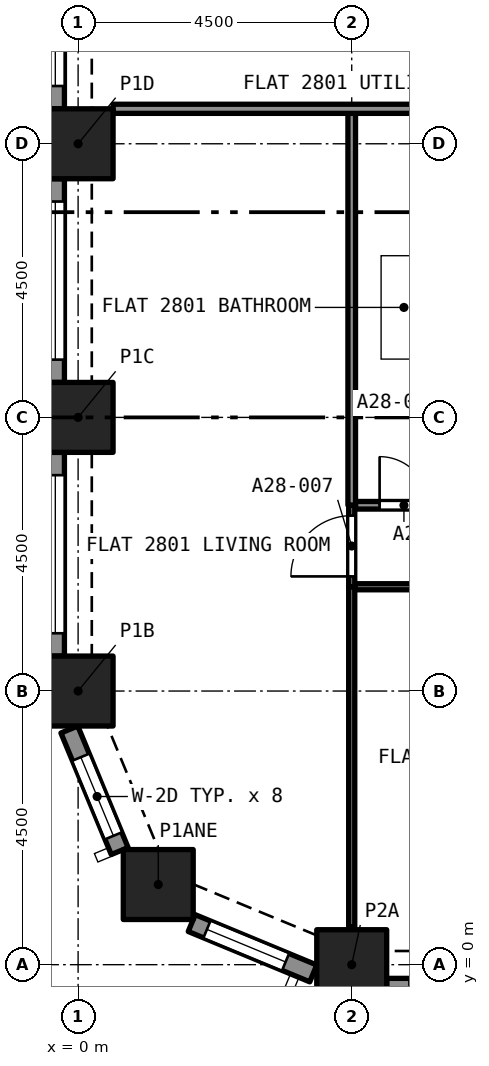
"""IFC4 building model, lengths in metres.
Left out: names, types, materials, properties, quantities, classifications, styles, units other than length and angle.
Written with IfcOpenShell. Run it as: python <this file> out.ifc"""

import sys

from ifc_helpers import new_model, si_unit, direction, frame, frame_2d, origin, origin_2d, place, context, subcontext, project, spatial, rectangle, extrude, element, fill, save


model = new_model("IFC4")
c1 = context("Model", 3, precision=1e-05, world=origin(), true_north=direction((0.0, 1.0)))
c2 = subcontext(c1, "Body", "Model", "MODEL_VIEW")
j1 = project(units=[si_unit("LENGTHUNIT", "METRE"), si_unit("PLANEANGLEUNIT", "RADIAN")], contexts=[c1])
p1 = place(None, origin())
s1 = spatial("IfcSite", under=j1, at=p1, CompositionType="ELEMENT")
p2 = place(p1, origin())
s2 = spatial("IfcBuilding", under=s1, at=p2, CompositionType="ELEMENT")
p3 = place(p2, frame((0.0, 0.0, 102.4)))
s3 = spatial("IfcBuildingStorey", under=s2, at=p3, CompositionType="ELEMENT", Elevation=102.4)
for number, where, z_axis, x_axis in (
    (1, (4.5, 0.0, 0.0), (0.0, 0.0, 1.0), (1.0, 0.0, 0.0)),
    (2, (1.318, 1.318, 0.0), (0.0, 0.0, 1.0), (1.0, 0.0, 0.0)),
    (3, (0.0, 4.5, 0.0), (0.0, 0.0, 1.0), (1.0, 0.0, 0.0)),
    (4, (0.0, 9.0, 0.0), (0.0, 0.0, 1.0), (1.0, 0.0, 0.0)),
    (5, (0.0, 13.5, 0.0), (0.0, 0.0, 1.0), (1.0, 0.0, 0.0)),
):
    element("IfcColumn", number, at=place(p3, frame(where, z_axis=z_axis, x_axis=x_axis)), inside=s3, PredefinedType="COLUMN", context=c2, shape_type="SweptSolid", body=[
        extrude(rectangle(XDim=1.15, YDim=1.15, at=origin_2d()), origin(), (0.0, 0.0, 1.0), 3.2),
    ])
p4 = place(p3, frame((0.684, 1.869, 0.0), z_axis=(0.0, 0.0, 1.0), x_axis=(-0.382723818695, 0.923862802911, 0.0)))
e6 = element("IfcWall", 6, at=p4, inside=s3, PredefinedType="SOLIDWALL", context=c2, shape_type="SweptSolid", body=[
    extrude(rectangle(XDim=2.164, YDim=0.3, at=frame_2d((1.082, 0.0))), origin(), (0.0, 0.0, 1.0), 3.2),
])
p5 = place(p4, frame((0.271, 0.0, 0.45)))
e7 = element("IfcOpeningElement", 7, at=p5, cuts=e6, PredefinedType="OPENING", context=c2, shape_type="SweptSolid", body=[
    extrude(rectangle(XDim=1.4, YDim=1.95, at=frame_2d((0.7, 0.975))), frame((0.0, 0.16, 0.0), z_axis=(0.0, -1.0, 0.0), x_axis=(1.0, 0.0, 0.0)), (0.0, 0.0, 1.0), 0.32),
])
p6 = place(p3, frame((3.868, -0.144, 0.0), z_axis=(0.0, 0.0, 1.0), x_axis=(-0.923862802911, 0.382723818695, 0.0)))
e8 = element("IfcWall", 8, at=p6, inside=s3, PredefinedType="SOLIDWALL", context=c2, shape_type="SweptSolid", body=[
    extrude(rectangle(XDim=2.164, YDim=0.3, at=frame_2d((1.082, 0.0))), origin(), (0.0, 0.0, 1.0), 3.2),
])
p7 = place(p6, frame((0.493, 0.0, 0.45)))
e9 = element("IfcOpeningElement", 9, at=p7, cuts=e8, PredefinedType="OPENING", context=c2, shape_type="SweptSolid", body=[
    extrude(rectangle(XDim=1.4, YDim=1.95, at=frame_2d((0.7, 0.975))), frame((0.0, 0.16, 0.0), z_axis=(0.0, -1.0, 0.0), x_axis=(1.0, 0.0, 0.0)), (0.0, 0.0, 1.0), 0.32),
])
p8 = place(p3, frame((8.425, -0.375, 0.0), z_axis=(0.0, 0.0, 1.0), x_axis=(-1.0, 0.0, 0.0)))
e10 = element("IfcWall", 10, at=p8, inside=s3, PredefinedType="SOLIDWALL", context=c2, shape_type="SweptSolid", body=[
    extrude(rectangle(XDim=3.35, YDim=0.3, at=frame_2d((1.675, 0.0))), origin(), (0.0, 0.0, 1.0), 3.2),
])
p9 = place(p8, frame((0.375, 0.0, 0.45)))
e11 = element("IfcOpeningElement", 11, at=p9, cuts=e10, PredefinedType="OPENING", context=c2, shape_type="SweptSolid", body=[
    extrude(rectangle(XDim=2.6, YDim=1.95, at=frame_2d((1.3, 0.975))), frame((0.0, 0.16, 0.0), z_axis=(0.0, -1.0, 0.0), x_axis=(1.0, 0.0, 0.0)), (0.0, 0.0, 1.0), 0.32),
])
p10 = place(p3, frame((-0.375, 14.075, 0.0), z_axis=(0.0, 0.0, 1.0), x_axis=(0.0, 1.0, 0.0)))
e12 = element("IfcWall", 12, at=p10, inside=s3, PredefinedType="SOLIDWALL", context=c2, shape_type="SweptSolid", body=[
    extrude(rectangle(XDim=3.35, YDim=0.3, at=frame_2d((1.675, 0.0))), origin(), (0.0, 0.0, 1.0), 3.2),
])
p11 = place(p10, frame((0.375, 0.0, 0.45)))
e13 = element("IfcOpeningElement", 13, at=p11, cuts=e12, PredefinedType="OPENING", context=c2, shape_type="SweptSolid", body=[
    extrude(rectangle(XDim=2.6, YDim=1.95, at=frame_2d((1.3, 0.975))), frame((0.0, 0.16, 0.0), z_axis=(0.0, -1.0, 0.0), x_axis=(1.0, 0.0, 0.0)), (0.0, 0.0, 1.0), 0.32),
])
p12 = place(p3, frame((-0.375, 9.575, 0.0), z_axis=(0.0, 0.0, 1.0), x_axis=(0.0, 1.0, 0.0)))
e14 = element("IfcWall", 14, at=p12, inside=s3, PredefinedType="SOLIDWALL", context=c2, shape_type="SweptSolid", body=[
    extrude(rectangle(XDim=3.35, YDim=0.3, at=frame_2d((1.675, 0.0))), origin(), (0.0, 0.0, 1.0), 3.2),
])
p13 = place(p12, frame((0.375, 0.0, 0.45)))
e15 = element("IfcOpeningElement", 15, at=p13, cuts=e14, PredefinedType="OPENING", context=c2, shape_type="SweptSolid", body=[
    extrude(rectangle(XDim=2.6, YDim=1.95, at=frame_2d((1.3, 0.975))), frame((0.0, 0.16, 0.0), z_axis=(0.0, -1.0, 0.0), x_axis=(1.0, 0.0, 0.0)), (0.0, 0.0, 1.0), 0.32),
])
p14 = place(p3, frame((-0.375, 5.075, 0.0), z_axis=(0.0, 0.0, 1.0), x_axis=(0.0, 1.0, 0.0)))
e16 = element("IfcWall", 16, at=p14, inside=s3, PredefinedType="SOLIDWALL", context=c2, shape_type="SweptSolid", body=[
    extrude(rectangle(XDim=3.35, YDim=0.3, at=frame_2d((1.675, 0.0))), origin(), (0.0, 0.0, 1.0), 3.2),
])
p15 = place(p14, frame((0.375, 0.0, 0.45)))
e17 = element("IfcOpeningElement", 17, at=p15, cuts=e16, PredefinedType="OPENING", context=c2, shape_type="SweptSolid", body=[
    extrude(rectangle(XDim=2.6, YDim=1.95, at=frame_2d((1.3, 0.975))), frame((0.0, 0.16, 0.0), z_axis=(0.0, -1.0, 0.0), x_axis=(1.0, 0.0, 0.0)), (0.0, 0.0, 1.0), 0.32),
])
p16 = place(p3, frame((4.562, 7.555, 0.0), z_axis=(0.0, 0.0, 1.0), x_axis=(1.0, 0.0, 0.0)))
e18 = element("IfcWall", 18, at=p16, inside=s3, PredefinedType="PARTITIONING", context=c2, shape_type="SweptSolid", body=[
    extrude(rectangle(XDim=1.655, YDim=0.125, at=frame_2d((0.827, 0.0))), origin(), (0.0, 0.0, 1.0), 2.9),
])
p17 = place(p16, frame((0.396, 0.0, 0.0)))
e19 = element("IfcOpeningElement", 19, at=p17, cuts=e18, PredefinedType="OPENING", context=c2, shape_type="SweptSolid", body=[
    extrude(rectangle(XDim=0.8, YDim=2.1, at=frame_2d((0.4, 1.05))), frame((0.0, 0.073, 0.0), z_axis=(0.0, -1.0, 0.0), x_axis=(1.0, 0.0, 0.0)), (0.0, 0.0, 1.0), 0.145),
])
p18 = place(p3, frame((4.5, 7.555, 0.0), z_axis=(0.0, 0.0, 1.0), x_axis=(0.0, 1.0, 0.0)))
e20 = element("IfcWall", 20, at=p18, inside=s3, PredefinedType="PARTITIONING", context=c2, shape_type="SweptSolid", body=[
    extrude(rectangle(XDim=6.445, YDim=0.125, at=frame_2d((3.223, 0.0))), origin(), (0.0, 0.0, 1.0), 2.9),
])
p19 = place(p3, frame((9.0, 6.215, 0.0), z_axis=(0.0, 0.0, 1.0), x_axis=(-1.0, 0.0, 0.0)))
e21 = element("IfcWall", 21, at=p19, inside=s3, PredefinedType="PARTITIONING", context=c2, shape_type="SweptSolid", body=[
    extrude(rectangle(XDim=4.45, YDim=0.1, at=frame_2d((2.225, 0.0))), origin(), (0.0, 0.0, 1.0), 2.9),
])
p20 = place(p19, frame((1.8, 0.0, 0.0)))
e22 = element("IfcOpeningElement", 22, at=p20, cuts=e21, PredefinedType="OPENING", context=c2, shape_type="SweptSolid", body=[
    extrude(rectangle(XDim=0.9, YDim=2.1, at=frame_2d((0.45, 1.05))), frame((0.0, 0.06, 0.0), z_axis=(0.0, -1.0, 0.0), x_axis=(1.0, 0.0, 0.0)), (0.0, 0.0, 1.0), 0.12),
])
p21 = place(p3, frame((4.5, 0.622, 0.0), z_axis=(0.0, 0.0, 1.0), x_axis=(0.0, 1.0, 0.0)))
e23 = element("IfcWall", 23, at=p21, inside=s3, PredefinedType="PARTITIONING", context=c2, shape_type="SweptSolid", body=[
    extrude(rectangle(XDim=5.593, YDim=0.1, at=frame_2d((2.796, 0.0))), origin(), (0.0, 0.0, 1.0), 2.9),
])
p22 = place(p3, frame((4.5, 6.215, 0.0), z_axis=(0.0, 0.0, 1.0), x_axis=(0.0, 1.0, 0.0)))
e24 = element("IfcWall", 24, at=p22, inside=s3, PredefinedType="PARTITIONING", context=c2, shape_type="SweptSolid", body=[
    extrude(rectangle(XDim=1.34, YDim=0.1, at=frame_2d((0.67, 0.0))), origin(), (0.0, 0.0, 1.0), 2.9),
])
p23 = place(p22, frame((0.17, 0.0, 0.0)))
e25 = element("IfcOpeningElement", 25, at=p23, cuts=e24, PredefinedType="OPENING", context=c2, shape_type="SweptSolid", body=[
    extrude(rectangle(XDim=1.0, YDim=2.1, at=frame_2d((0.5, 1.05))), frame((0.0, 0.06, 0.0), z_axis=(0.0, -1.0, 0.0), x_axis=(1.0, 0.0, 0.0)), (0.0, 0.0, 1.0), 0.12),
])
p24 = place(p3, frame((0.575, 14.075, 0.0), z_axis=(0.0, 0.0, 1.0), x_axis=(1.0, 0.0, 0.0)))
e26 = element("IfcWall", 26, at=p24, inside=s3, PredefinedType="PARTITIONING", context=c2, shape_type="SweptSolid", body=[
    extrude(rectangle(XDim=13.45, YDim=0.15, at=frame_2d((6.725, 0.0))), origin(), (0.0, 0.0, 1.0), 2.9),
])
p25 = place(p5, origin())
e27 = element("IfcWindow", 27, at=p25, inside=s3, PartitioningType="SINGLE_PANEL", PredefinedType="WINDOW", context=c2, shape_type="SweptSolid", body=[
    extrude(rectangle(XDim=1.4, YDim=1.95, at=frame_2d((0.7, 0.975))), frame((0.0, 0.03, 0.0), z_axis=(0.0, -1.0, 0.0), x_axis=(1.0, 0.0, 0.0)), (0.0, 0.0, 1.0), 0.06),
])
fill(e7, e27)
p26 = place(p7, origin())
e28 = element("IfcWindow", 28, at=p26, inside=s3, PartitioningType="SINGLE_PANEL", PredefinedType="WINDOW", context=c2, shape_type="SweptSolid", body=[
    extrude(rectangle(XDim=1.4, YDim=1.95, at=frame_2d((0.7, 0.975))), frame((0.0, 0.03, 0.0), z_axis=(0.0, -1.0, 0.0), x_axis=(1.0, 0.0, 0.0)), (0.0, 0.0, 1.0), 0.06),
])
fill(e9, e28)
p27 = place(p11, origin())
e29 = element("IfcWindow", 29, at=p27, inside=s3, PartitioningType="SINGLE_PANEL", PredefinedType="WINDOW", context=c2, shape_type="SweptSolid", body=[
    extrude(rectangle(XDim=2.6, YDim=1.95, at=frame_2d((1.3, 0.975))), frame((0.0, 0.03, 0.0), z_axis=(0.0, -1.0, 0.0), x_axis=(1.0, 0.0, 0.0)), (0.0, 0.0, 1.0), 0.06),
])
fill(e13, e29)
p28 = place(p13, origin())
e30 = element("IfcWindow", 30, at=p28, inside=s3, PartitioningType="SINGLE_PANEL", PredefinedType="WINDOW", context=c2, shape_type="SweptSolid", body=[
    extrude(rectangle(XDim=2.6, YDim=1.95, at=frame_2d((1.3, 0.975))), frame((0.0, 0.03, 0.0), z_axis=(0.0, -1.0, 0.0), x_axis=(1.0, 0.0, 0.0)), (0.0, 0.0, 1.0), 0.06),
])
fill(e15, e30)
p29 = place(p15, origin())
e31 = element("IfcWindow", 31, at=p29, inside=s3, PartitioningType="SINGLE_PANEL", PredefinedType="WINDOW", context=c2, shape_type="SweptSolid", body=[
    extrude(rectangle(XDim=2.6, YDim=1.95, at=frame_2d((1.3, 0.975))), frame((0.0, 0.03, 0.0), z_axis=(0.0, -1.0, 0.0), x_axis=(1.0, 0.0, 0.0)), (0.0, 0.0, 1.0), 0.06),
])
fill(e17, e31)
p30 = place(p17, origin())
e32 = element("IfcDoor", 32, at=p30, inside=s3, OperationType="SINGLE_SWING_LEFT", PredefinedType="DOOR", context=c2, shape_type="SweptSolid", body=[
    extrude(rectangle(XDim=0.8, YDim=2.1, at=frame_2d((0.4, 1.05))), frame((0.0, 0.025, 0.0), z_axis=(0.0, -1.0, 0.0), x_axis=(1.0, 0.0, 0.0)), (0.0, 0.0, 1.0), 0.05),
])
fill(e19, e32)
p31 = place(p23, origin())
e33 = element("IfcDoor", 33, at=p31, inside=s3, OperationType="SINGLE_SWING_RIGHT", PredefinedType="DOOR", context=c2, shape_type="SweptSolid", body=[
    extrude(rectangle(XDim=1.0, YDim=2.1, at=frame_2d((0.5, 1.05))), frame((0.0, 0.025, 0.0), z_axis=(0.0, -1.0, 0.0), x_axis=(1.0, 0.0, 0.0)), (0.0, 0.0, 1.0), 0.05),
])
fill(e25, e33)
save(model, sys.argv[1])
